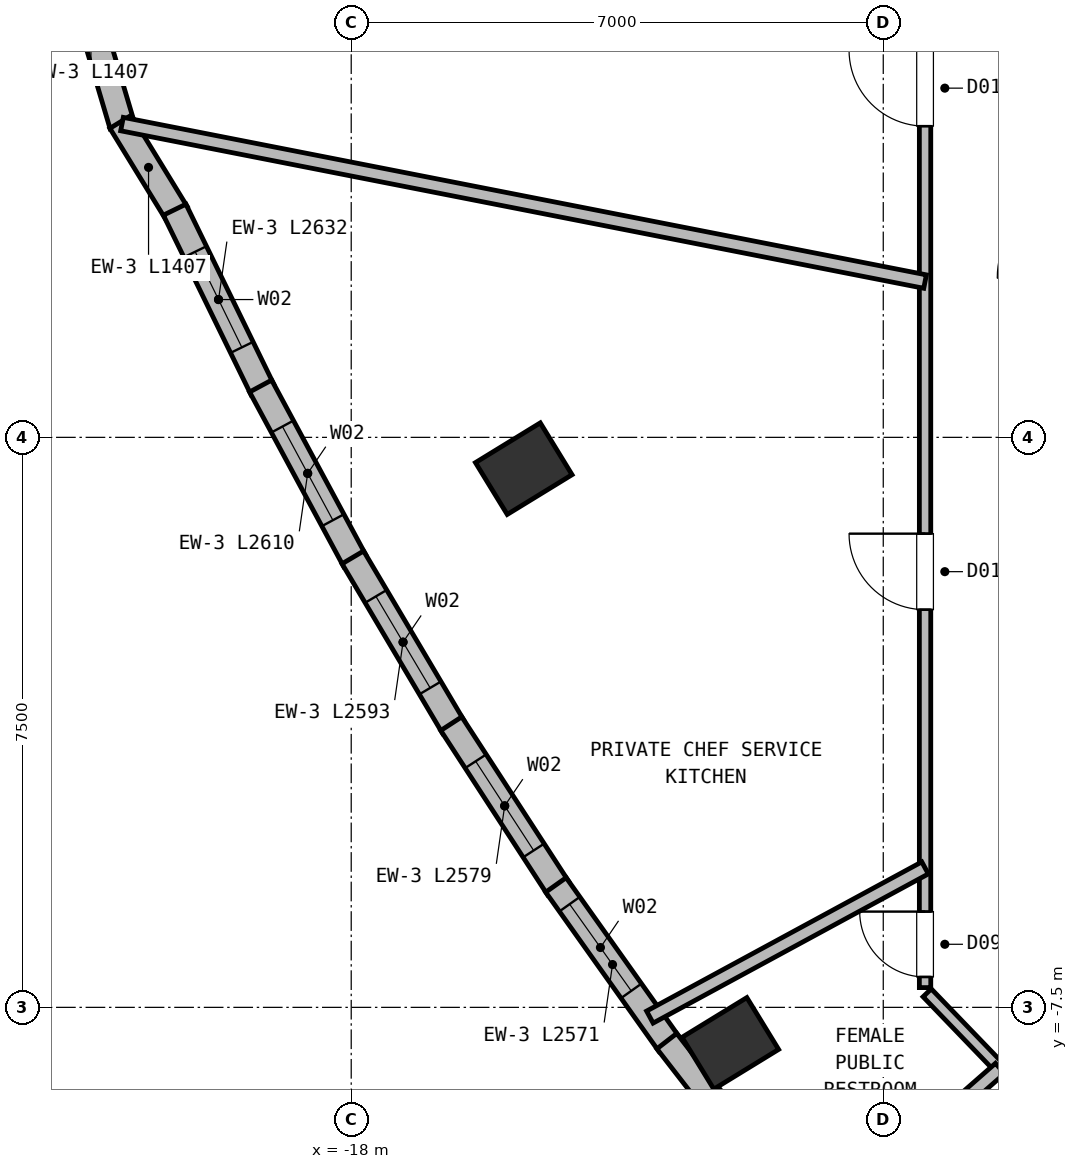
"""IFC4 building model, lengths in metres.
Left out: names, types, materials, properties, quantities, classifications, styles, units other than length and angle.
Written with IfcOpenShell. Run it as: python <this file> out.ifc"""

import sys

from ifc_helpers import new_model, si_unit, direction, frame, frame_2d, origin, origin_2d, place, context, subcontext, project, spatial, rectangle, extrude, element, fill, save


model = new_model("IFC4")
c1 = context("Model", 3, precision=1e-05, world=origin(), true_north=direction((0.0, 1.0)))
c2 = subcontext(c1, "Body", "Model", "MODEL_VIEW")
j1 = project(units=[si_unit("LENGTHUNIT", "METRE"), si_unit("PLANEANGLEUNIT", "RADIAN")], contexts=[c1])
p1 = place(None, origin())
s1 = spatial("IfcSite", under=j1, at=p1, CompositionType="ELEMENT")
p2 = place(p1, origin())
s2 = spatial("IfcBuilding", under=s1, at=p2, CompositionType="ELEMENT")
p3 = place(p2, frame((0.0, 0.0, 239.75)))
s3 = spatial("IfcBuildingStorey", under=s2, at=p3, CompositionType="ELEMENT", Elevation=239.75)
for number, where, z_axis, x_axis in (
    (1, (-15.73, -0.412, 0.0), (0.0, 0.0, 1.0), (-0.522, 0.853, 0.0)),
    (2, (-13.012, -7.974, 0.0), (0.0, 0.0, 1.0), (-0.522, 0.853, 0.0)),
):
    element("IfcColumn", number, at=place(p3, frame(where, z_axis=z_axis, x_axis=x_axis)), inside=s3, PredefinedType="COLUMN", context=c2, shape_type="SweptSolid", body=[
        extrude(rectangle(XDim=0.8, YDim=1.0, at=origin_2d()), origin(), (0.0, 0.0, 1.0), 3.8),
    ])
p4 = place(p3, frame((-21.014, 4.107, 0.0), z_axis=(0.0, 0.0, 1.0), x_axis=(-0.284100140437, 0.958794613149, 0.0)))
e3 = element("IfcWall", 3, at=p4, inside=s3, PredefinedType="SOLIDWALL", context=c2, shape_type="SweptSolid", body=[
    extrude(rectangle(XDim=1.408, YDim=0.33, at=frame_2d((0.704, 0.0))), origin(), (0.0, 0.0, 1.0), 3.55),
])
p5 = place(p3, frame((-20.299, 2.952, 0.0), z_axis=(0.0, 0.0, 1.0), x_axis=(-0.522431898615, 0.852681013809, 0.0)))
e4 = element("IfcWall", 4, at=p5, inside=s3, PredefinedType="SOLIDWALL", context=c2, shape_type="SweptSolid", body=[
    extrude(rectangle(XDim=1.407, YDim=0.33, at=frame_2d((0.704, 0.0))), origin(), (0.0, 0.0, 1.0), 3.55),
])
p6 = place(p3, frame((-19.169, 0.631, 0.0), z_axis=(0.0, 0.0, 1.0), x_axis=(-0.438509531978, 0.898726538144, 0.0)))
e5 = element("IfcWall", 5, at=p6, inside=s3, PredefinedType="SOLIDWALL", context=c2, shape_type="SweptSolid", body=[
    extrude(rectangle(XDim=2.632, YDim=0.33, at=frame_2d((1.316, 0.0))), origin(), (0.0, 0.0, 1.0), 3.55),
])
p7 = place(p6, frame((0.616, 0.0, 0.72)))
e6 = element("IfcOpeningElement", 6, at=p7, cuts=e5, PredefinedType="OPENING", context=c2, shape_type="SweptSolid", body=[
    extrude(rectangle(XDim=1.4, YDim=1.84, at=frame_2d((0.7, 0.92))), frame((0.0, 0.175, 0.0), z_axis=(0.0, -1.0, 0.0), x_axis=(1.0, 0.0, 0.0)), (0.0, 0.0, 1.0), 0.35),
])
p8 = place(p3, frame((-17.954, -1.623, 0.0), z_axis=(0.0, 0.0, 1.0), x_axis=(-0.474244845608, 0.880392995437, 0.0)))
e7 = element("IfcWall", 7, at=p8, inside=s3, PredefinedType="SOLIDWALL", context=c2, shape_type="SweptSolid", body=[
    extrude(rectangle(XDim=2.61, YDim=0.33, at=frame_2d((1.305, 0.0))), origin(), (0.0, 0.0, 1.0), 3.55),
])
p9 = place(p8, frame((0.605, 0.0, 0.72)))
e8 = element("IfcOpeningElement", 8, at=p9, cuts=e7, PredefinedType="OPENING", context=c2, shape_type="SweptSolid", body=[
    extrude(rectangle(XDim=1.4, YDim=1.84, at=frame_2d((0.7, 0.92))), frame((0.0, 0.175, 0.0), z_axis=(0.0, -1.0, 0.0), x_axis=(1.0, 0.0, 0.0)), (0.0, 0.0, 1.0), 0.35),
])
p10 = place(p3, frame((-16.657, -3.81, 0.0), z_axis=(0.0, 0.0, 1.0), x_axis=(-0.509737856677, 0.860329772512, 0.0)))
e9 = element("IfcWall", 9, at=p10, inside=s3, PredefinedType="SOLIDWALL", context=c2, shape_type="SweptSolid", body=[
    extrude(rectangle(XDim=2.593, YDim=0.33, at=frame_2d((1.296, 0.0))), origin(), (0.0, 0.0, 1.0), 3.55),
])
p11 = place(p10, frame((0.596, 0.0, 0.72)))
e10 = element("IfcOpeningElement", 10, at=p11, cuts=e9, PredefinedType="OPENING", context=c2, shape_type="SweptSolid", body=[
    extrude(rectangle(XDim=1.4, YDim=1.84, at=frame_2d((0.7, 0.92))), frame((0.0, 0.175, 0.0), z_axis=(0.0, -1.0, 0.0), x_axis=(1.0, 0.0, 0.0)), (0.0, 0.0, 1.0), 0.35),
])
p12 = place(p3, frame((-15.278, -5.93, 0.0), z_axis=(0.0, 0.0, 1.0), x_axis=(-0.544788727903, 0.838573337252, 0.0)))
e11 = element("IfcWall", 11, at=p12, inside=s3, PredefinedType="SOLIDWALL", context=c2, shape_type="SweptSolid", body=[
    extrude(rectangle(XDim=2.58, YDim=0.33, at=frame_2d((1.29, 0.0))), origin(), (0.0, 0.0, 1.0), 3.55),
])
p13 = place(p12, frame((0.59, 0.0, 0.72)))
e12 = element("IfcOpeningElement", 12, at=p13, cuts=e11, PredefinedType="OPENING", context=c2, shape_type="SweptSolid", body=[
    extrude(rectangle(XDim=1.4, YDim=1.84, at=frame_2d((0.7, 0.92))), frame((0.0, 0.175, 0.0), z_axis=(0.0, -1.0, 0.0), x_axis=(1.0, 0.0, 0.0)), (0.0, 0.0, 1.0), 0.35),
])
p14 = place(p3, frame((-13.817, -7.984, 0.0), z_axis=(0.0, 0.0, 1.0), x_axis=(-0.579242009098, 0.815155626182, 0.0)))
e13 = element("IfcWall", 13, at=p14, inside=s3, PredefinedType="SOLIDWALL", context=c2, shape_type="SweptSolid", body=[
    extrude(rectangle(XDim=2.571, YDim=0.33, at=frame_2d((1.285, 0.0))), origin(), (0.0, 0.0, 1.0), 3.55),
])
p15 = place(p14, frame((0.86, 0.0, 0.72)))
e14 = element("IfcOpeningElement", 14, at=p15, cuts=e13, PredefinedType="OPENING", context=c2, shape_type="SweptSolid", body=[
    extrude(rectangle(XDim=1.4, YDim=1.84, at=frame_2d((0.7, 0.92))), frame((0.0, 0.175, 0.0), z_axis=(0.0, -1.0, 0.0), x_axis=(1.0, 0.0, 0.0)), (0.0, 0.0, 1.0), 0.35),
])
p16 = place(p3, frame((-12.275, -9.972, 0.0), z_axis=(0.0, 0.0, 1.0), x_axis=(-0.612859890166, 0.790191593872, 0.0)))
e15 = element("IfcWall", 15, at=p16, inside=s3, PredefinedType="SOLIDWALL", context=c2, shape_type="SweptSolid", body=[
    extrude(rectangle(XDim=2.566, YDim=0.33, at=frame_2d((1.283, 0.0))), origin(), (0.0, 0.0, 1.0), 3.55),
])
p17 = place(p3, frame((-10.45, -7.24, 0.0), z_axis=(0.0, 0.0, 1.0), x_axis=(0.0, 1.0, 0.0)))
e16 = element("IfcWall", 16, at=p17, inside=s3, PredefinedType="PARTITIONING", context=c2, shape_type="SweptSolid", body=[
    extrude(rectangle(XDim=14.48, YDim=0.15, at=frame_2d((7.24, 0.0))), origin(), (0.0, 0.0, 1.0), 3.23),
])
p18 = place(p17, frame((0.14, 0.0, 0.0)))
e17 = element("IfcOpeningElement", 17, at=p18, cuts=e16, PredefinedType="OPENING", context=c2, shape_type="SweptSolid", body=[
    extrude(rectangle(XDim=0.86, YDim=2.05, at=frame_2d((0.43, 1.025))), frame((0.0, 0.085, 0.0), z_axis=(0.0, -1.0, 0.0), x_axis=(1.0, 0.0, 0.0)), (0.0, 0.0, 1.0), 0.17),
])
p19 = place(p17, frame((4.973, 0.0, 0.0)))
e18 = element("IfcOpeningElement", 18, at=p19, cuts=e16, PredefinedType="OPENING", context=c2, shape_type="SweptSolid", body=[
    extrude(rectangle(XDim=1.0, YDim=2.15, at=frame_2d((0.5, 1.075))), frame((0.0, 0.085, 0.0), z_axis=(0.0, -1.0, 0.0), x_axis=(1.0, 0.0, 0.0)), (0.0, 0.0, 1.0), 0.17),
])
p20 = place(p17, frame((11.335, 0.0, 0.0)))
e19 = element("IfcOpeningElement", 19, at=p20, cuts=e16, PredefinedType="OPENING", context=c2, shape_type="SweptSolid", body=[
    extrude(rectangle(XDim=1.0, YDim=2.15, at=frame_2d((0.5, 1.075))), frame((0.0, 0.085, 0.0), z_axis=(0.0, -1.0, 0.0), x_axis=(1.0, 0.0, 0.0)), (0.0, 0.0, 1.0), 0.17),
])
p21 = place(p3, frame((-8.648, -9.151, 0.0), z_axis=(0.0, 0.0, 1.0), x_axis=(-0.693764562202, 0.720201869085, 0.0)))
e20 = element("IfcWall", 20, at=p21, inside=s3, PredefinedType="PARTITIONING", context=c2, shape_type="SweptSolid", body=[
    extrude(rectangle(XDim=2.558, YDim=0.15, at=frame_2d((1.279, 0.0))), origin(), (0.0, 0.0, 1.0), 3.23),
])
p22 = place(p3, frame((-10.45, 2.05, 0.0), z_axis=(0.0, 0.0, 1.0), x_axis=(-0.981304682167, 0.192460699252, 0.0)))
e21 = element("IfcWall", 21, at=p22, inside=s3, PredefinedType="PARTITIONING", context=c2, shape_type="SweptSolid", body=[
    extrude(rectangle(XDim=10.767, YDim=0.18, at=frame_2d((5.384, 0.0))), origin(), (0.0, 0.0, 1.0), 3.55),
])
p23 = place(p3, frame((-10.45, -5.665, 0.0), z_axis=(0.0, 0.0, 1.0), x_axis=(-0.879154356789, -0.476537109718, 0.0)))
e22 = element("IfcWall", 22, at=p23, inside=s3, PredefinedType="PARTITIONING", context=c2, shape_type="SweptSolid", body=[
    extrude(rectangle(XDim=4.119, YDim=0.18, at=frame_2d((2.059, 0.0))), origin(), (0.0, 0.0, 1.0), 3.55),
])
p24 = place(p3, frame((-9.464, -8.304, 0.0), z_axis=(0.0, 0.0, 1.0), x_axis=(-0.751698496635, -0.659506914411, 0.0)))
e23 = element("IfcWall", 23, at=p24, inside=s3, PredefinedType="PARTITIONING", context=c2, shape_type="SweptSolid", body=[
    extrude(rectangle(XDim=3.223, YDim=0.18, at=frame_2d((1.611, 0.0))), origin(), (0.0, 0.0, 1.0), 3.55),
])
p25 = place(p7, origin())
e24 = element("IfcWindow", 24, at=p25, inside=s3, PartitioningType="SINGLE_PANEL", PredefinedType="WINDOW", context=c2, shape_type="SweptSolid", body=[
    extrude(rectangle(XDim=1.4, YDim=1.84, at=frame_2d((0.7, 0.92))), frame((0.0, 0.03, 0.0), z_axis=(0.0, -1.0, 0.0), x_axis=(1.0, 0.0, 0.0)), (0.0, 0.0, 1.0), 0.06),
])
fill(e6, e24)
p26 = place(p9, origin())
e25 = element("IfcWindow", 25, at=p26, inside=s3, PartitioningType="SINGLE_PANEL", PredefinedType="WINDOW", context=c2, shape_type="SweptSolid", body=[
    extrude(rectangle(XDim=1.4, YDim=1.84, at=frame_2d((0.7, 0.92))), frame((0.0, 0.03, 0.0), z_axis=(0.0, -1.0, 0.0), x_axis=(1.0, 0.0, 0.0)), (0.0, 0.0, 1.0), 0.06),
])
fill(e8, e25)
p27 = place(p11, origin())
e26 = element("IfcWindow", 26, at=p27, inside=s3, PartitioningType="SINGLE_PANEL", PredefinedType="WINDOW", context=c2, shape_type="SweptSolid", body=[
    extrude(rectangle(XDim=1.4, YDim=1.84, at=frame_2d((0.7, 0.92))), frame((0.0, 0.03, 0.0), z_axis=(0.0, -1.0, 0.0), x_axis=(1.0, 0.0, 0.0)), (0.0, 0.0, 1.0), 0.06),
])
fill(e10, e26)
p28 = place(p13, origin())
e27 = element("IfcWindow", 27, at=p28, inside=s3, PartitioningType="SINGLE_PANEL", PredefinedType="WINDOW", context=c2, shape_type="SweptSolid", body=[
    extrude(rectangle(XDim=1.4, YDim=1.84, at=frame_2d((0.7, 0.92))), frame((0.0, 0.03, 0.0), z_axis=(0.0, -1.0, 0.0), x_axis=(1.0, 0.0, 0.0)), (0.0, 0.0, 1.0), 0.06),
])
fill(e12, e27)
p29 = place(p15, origin())
e28 = element("IfcWindow", 28, at=p29, inside=s3, PartitioningType="SINGLE_PANEL", PredefinedType="WINDOW", context=c2, shape_type="SweptSolid", body=[
    extrude(rectangle(XDim=1.4, YDim=1.84, at=frame_2d((0.7, 0.92))), frame((0.0, 0.03, 0.0), z_axis=(0.0, -1.0, 0.0), x_axis=(1.0, 0.0, 0.0)), (0.0, 0.0, 1.0), 0.06),
])
fill(e14, e28)
p30 = place(p18, origin())
e29 = element("IfcDoor", 29, at=p30, inside=s3, OperationType="SINGLE_SWING_RIGHT", PredefinedType="DOOR", context=c2, shape_type="SweptSolid", body=[
    extrude(rectangle(XDim=0.86, YDim=2.05, at=frame_2d((0.43, 1.025))), frame((0.0, 0.025, 0.0), z_axis=(0.0, -1.0, 0.0), x_axis=(1.0, 0.0, 0.0)), (0.0, 0.0, 1.0), 0.05),
])
fill(e17, e29)
p31 = place(p19, origin())
e30 = element("IfcDoor", 30, at=p31, inside=s3, OperationType="SINGLE_SWING_RIGHT", PredefinedType="DOOR", context=c2, shape_type="SweptSolid", body=[
    extrude(rectangle(XDim=1.0, YDim=2.15, at=frame_2d((0.5, 1.075))), frame((0.0, 0.025, 0.0), z_axis=(0.0, -1.0, 0.0), x_axis=(1.0, 0.0, 0.0)), (0.0, 0.0, 1.0), 0.05),
])
fill(e18, e30)
p32 = place(p20, origin())
e31 = element("IfcDoor", 31, at=p32, inside=s3, OperationType="SINGLE_SWING_RIGHT", PredefinedType="DOOR", context=c2, shape_type="SweptSolid", body=[
    extrude(rectangle(XDim=1.0, YDim=2.15, at=frame_2d((0.5, 1.075))), frame((0.0, 0.025, 0.0), z_axis=(0.0, -1.0, 0.0), x_axis=(1.0, 0.0, 0.0)), (0.0, 0.0, 1.0), 0.05),
])
fill(e19, e31)
save(model, sys.argv[1])
